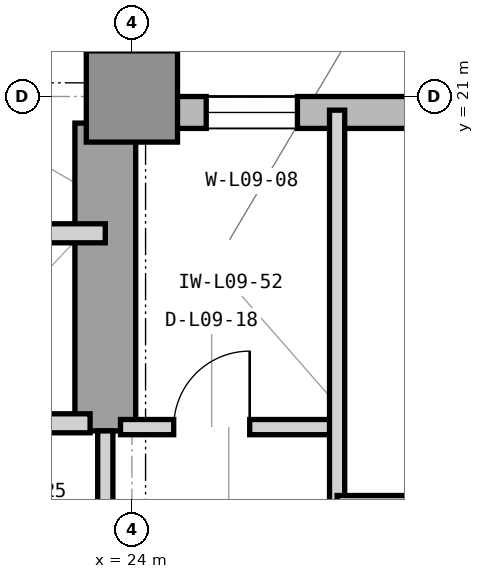
"""IFC4 building model, lengths in metres.
Left out: names, types, materials, properties, quantities, classifications, styles, units other than length and angle.
Written with IfcOpenShell. Run it as: python <this file> out.ifc"""

import sys

from ifc_helpers import new_model, si_unit, direction, frame, frame_2d, origin, origin_2d, place, context, subcontext, project, spatial, rectangle, extrude, element, fill, save


model = new_model("IFC4")
c1 = context("Model", 3, precision=1e-05, world=origin(), true_north=direction((0.0, 1.0)))
c2 = subcontext(c1, "Body", "Model", "MODEL_VIEW")
j1 = project(units=[si_unit("LENGTHUNIT", "METRE"), si_unit("PLANEANGLEUNIT", "RADIAN")], contexts=[c1])
p1 = place(None, origin())
s1 = spatial("IfcSite", under=j1, at=p1, CompositionType="ELEMENT")
p2 = place(p1, origin())
s2 = spatial("IfcBuilding", under=s1, at=p2, CompositionType="ELEMENT")
p3 = place(p2, frame((0.0, 0.0, 42.6)))
s3 = spatial("IfcBuildingStorey", under=s2, at=p3, CompositionType="ELEMENT", Elevation=42.6)
p4 = place(p3, frame((23.65, 16.6, 0.0), z_axis=(0.0, 0.0, 1.0), x_axis=(0.0, 1.0, 0.0)))
e1 = element("IfcWall", 1, at=p4, inside=s3, PredefinedType="SHEAR", context=c2, shape_type="SweptSolid", body=[
    extrude(rectangle(XDim=4.05, YDim=0.8, at=frame_2d((2.025, 0.0))), origin(), (0.0, 0.0, 1.0), 4.2),
])
p5 = place(p3, frame((24.0, 21.0, 0.0), z_axis=(0.0, 0.0, 1.0), x_axis=(1.0, 0.0, 0.0)))
e2 = element("IfcColumn", 2, at=p5, inside=s3, PredefinedType="COLUMN", context=c2, shape_type="SweptSolid", body=[
    extrude(rectangle(XDim=1.2, YDim=1.2, at=origin_2d()), origin(), (0.0, 0.0, 1.0), 4.2),
])
p6 = place(p3, frame((64.4, 20.79, 0.0), z_axis=(0.0, 0.0, 1.0), x_axis=(-1.0, 0.0, 0.0)))
e3 = element("IfcWall", 3, at=p6, inside=s3, PredefinedType="STANDARD", context=c2, shape_type="SweptSolid", body=[
    extrude(rectangle(XDim=40.4, YDim=0.42, at=frame_2d((20.2, 0.0))), origin(), (0.0, 0.0, 1.0), 3.98),
])
p7 = place(p6, frame((26.375, 0.0, 0.85)))
e4 = element("IfcOpeningElement", 4, at=p7, cuts=e3, PredefinedType="OPENING", context=c2, shape_type="SweptSolid", body=[
    extrude(rectangle(XDim=2.8, YDim=2.45, at=frame_2d((1.4, 1.225))), frame((0.0, 0.22, 0.0), z_axis=(0.0, -1.0, 0.0), x_axis=(1.0, 0.0, 0.0)), (0.0, 0.0, 1.0), 0.44),
])
p8 = place(p6, frame((38.222, 0.0, 0.85)))
e5 = element("IfcOpeningElement", 5, at=p8, cuts=e3, PredefinedType="OPENING", context=c2, shape_type="SweptSolid", body=[
    extrude(rectangle(XDim=1.2, YDim=2.45, at=frame_2d((0.6, 1.225))), frame((0.0, 0.22, 0.0), z_axis=(0.0, -1.0, 0.0), x_axis=(1.0, 0.0, 0.0)), (0.0, 0.0, 1.0), 0.44),
])
p9 = place(p6, frame((32.536, 0.0, 0.85)))
e6 = element("IfcOpeningElement", 6, at=p9, cuts=e3, PredefinedType="OPENING", context=c2, shape_type="SweptSolid", body=[
    extrude(rectangle(XDim=2.8, YDim=2.45, at=frame_2d((1.4, 1.225))), frame((0.0, 0.22, 0.0), z_axis=(0.0, -1.0, 0.0), x_axis=(1.0, 0.0, 0.0)), (0.0, 0.0, 1.0), 0.44),
])
p10 = place(p6, frame((17.386, 0.0, 0.85)))
e7 = element("IfcOpeningElement", 7, at=p10, cuts=e3, PredefinedType="OPENING", context=c2, shape_type="SweptSolid", body=[
    extrude(rectangle(XDim=2.8, YDim=2.45, at=frame_2d((1.4, 1.225))), frame((0.0, 0.22, 0.0), z_axis=(0.0, -1.0, 0.0), x_axis=(1.0, 0.0, 0.0)), (0.0, 0.0, 1.0), 0.44),
])
p11 = place(p3, frame((23.79, 21.0, 0.0), z_axis=(0.0, 0.0, 1.0), x_axis=(0.0, 1.0, 0.0)))
e8 = element("IfcWall", 8, at=p11, inside=s3, PredefinedType="STANDARD", context=c2, shape_type="SweptSolid", body=[
    extrude(rectangle(XDim=28.4, YDim=0.42, at=frame_2d((14.2, 0.0))), origin(), (0.0, 0.0, 1.0), 3.98),
])
p12 = place(p11, frame((10.433, 0.0, 0.85)))
e9 = element("IfcOpeningElement", 9, at=p12, cuts=e8, PredefinedType="OPENING", context=c2, shape_type="SweptSolid", body=[
    extrude(rectangle(XDim=2.8, YDim=2.45, at=frame_2d((1.4, 1.225))), frame((0.0, 0.22, 0.0), z_axis=(0.0, -1.0, 0.0), x_axis=(1.0, 0.0, 0.0)), (0.0, 0.0, 1.0), 0.44),
])
p13 = place(p11, frame((16.016, 0.0, 0.85)))
e10 = element("IfcOpeningElement", 10, at=p13, cuts=e8, PredefinedType="OPENING", context=c2, shape_type="SweptSolid", body=[
    extrude(rectangle(XDim=1.2, YDim=2.45, at=frame_2d((0.6, 1.225))), frame((0.0, 0.22, 0.0), z_axis=(0.0, -1.0, 0.0), x_axis=(1.0, 0.0, 0.0)), (0.0, 0.0, 1.0), 0.44),
])
p14 = place(p3, frame((21.05, 16.7, 0.0), z_axis=(0.0, 0.0, 1.0), x_axis=(1.0, 0.0, 0.0)))
e11 = element("IfcWall", 11, at=p14, inside=s3, PredefinedType="PARTITIONING", context=c2, shape_type="SweptSolid", body=[
    extrude(rectangle(XDim=2.4, YDim=0.25, at=frame_2d((1.2, 0.0))), origin(), (0.0, 0.0, 1.0), 3.426),
])
p15 = place(p3, frame((16.45, 19.2, 0.0), z_axis=(0.0, 0.0, 1.0), x_axis=(1.0, 0.0, 0.0)))
e12 = element("IfcWall", 12, at=p15, inside=s3, PredefinedType="PARTITIONING", context=c2, shape_type="SweptSolid", body=[
    extrude(rectangle(XDim=7.2, YDim=0.25, at=frame_2d((3.6, 0.0))), origin(), (0.0, 0.0, 1.0), 3.97),
])
p16 = place(p3, frame((23.65, 13.6, 0.0), z_axis=(0.0, 0.0, 1.0), x_axis=(0.0, 1.0, 0.0)))
e13 = element("IfcWall", 13, at=p16, inside=s3, PredefinedType="PARTITIONING", context=c2, shape_type="SweptSolid", body=[
    extrude(rectangle(XDim=3.0, YDim=0.2, at=frame_2d((1.5, 0.0))), origin(), (0.0, 0.0, 1.0), 3.97),
])
p17 = place(p3, frame((23.85, 16.65, 0.0), z_axis=(0.0, 0.0, 1.0), x_axis=(1.0, 0.0, 0.0)))
e14 = element("IfcWall", 14, at=p17, inside=s3, PredefinedType="PARTITIONING", context=c2, shape_type="SweptSolid", body=[
    extrude(rectangle(XDim=2.85, YDim=0.2, at=frame_2d((1.425, 0.0))), origin(), (0.0, 0.0, 1.0), 3.97),
])
p18 = place(p17, frame((0.7, 0.0, 0.0)))
e15 = element("IfcOpeningElement", 15, at=p18, cuts=e14, PredefinedType="OPENING", context=c2, shape_type="SweptSolid", body=[
    extrude(rectangle(XDim=1.0, YDim=2.15, at=frame_2d((0.5, 1.075))), frame((0.0, 0.11, 0.0), z_axis=(0.0, -1.0, 0.0), x_axis=(1.0, 0.0, 0.0)), (0.0, 0.0, 1.0), 0.22),
])
p19 = place(p3, frame((26.7, 15.65, 0.0), z_axis=(0.0, 0.0, 1.0), x_axis=(0.0, 1.0, 0.0)))
e16 = element("IfcWall", 16, at=p19, inside=s3, PredefinedType="PARTITIONING", context=c2, shape_type="SweptSolid", body=[
    extrude(rectangle(XDim=5.17, YDim=0.2, at=frame_2d((2.585, 0.0))), origin(), (0.0, 0.0, 1.0), 3.97),
])
p20 = place(p3, frame((26.7, 15.65, 0.0), z_axis=(0.0, 0.0, 1.0), x_axis=(1.0, 0.0, 0.0)))
e17 = element("IfcWall", 17, at=p20, inside=s3, PredefinedType="PARTITIONING", context=c2, shape_type="SweptSolid", body=[
    extrude(rectangle(XDim=7.5, YDim=0.2, at=frame_2d((3.75, 0.0))), origin(), (0.0, 0.0, 1.0), 3.97),
])
p21 = place(p20, frame((3.25, 0.0, 0.0)))
e18 = element("IfcOpeningElement", 18, at=p21, cuts=e17, PredefinedType="OPENING", context=c2, shape_type="SweptSolid", body=[
    extrude(rectangle(XDim=1.0, YDim=2.15, at=frame_2d((0.5, 1.075))), frame((0.0, 0.11, 0.0), z_axis=(0.0, -1.0, 0.0), x_axis=(1.0, 0.0, 0.0)), (0.0, 0.0, 1.0), 0.22),
])
p22 = place(p18, origin())
e19 = element("IfcDoor", 19, at=p22, inside=s3, OperationType="SINGLE_SWING_RIGHT", PredefinedType="DOOR", context=c2, shape_type="SweptSolid", body=[
    extrude(rectangle(XDim=1.0, YDim=2.15, at=frame_2d((0.5, 1.075))), frame((0.0, 0.025, 0.0), z_axis=(0.0, -1.0, 0.0), x_axis=(1.0, 0.0, 0.0)), (0.0, 0.0, 1.0), 0.05),
])
fill(e15, e19)
p23 = place(p8, origin())
e20 = element("IfcWindow", 20, at=p23, inside=s3, PartitioningType="SINGLE_PANEL", PredefinedType="WINDOW", context=c2, shape_type="SweptSolid", body=[
    extrude(rectangle(XDim=1.2, YDim=2.45, at=frame_2d((0.6, 1.225))), frame((0.0, 0.11, 0.0), z_axis=(0.0, -1.0, 0.0), x_axis=(1.0, 0.0, 0.0)), (0.0, 0.0, 1.0), 0.06),
])
fill(e5, e20)
save(model, sys.argv[1])
